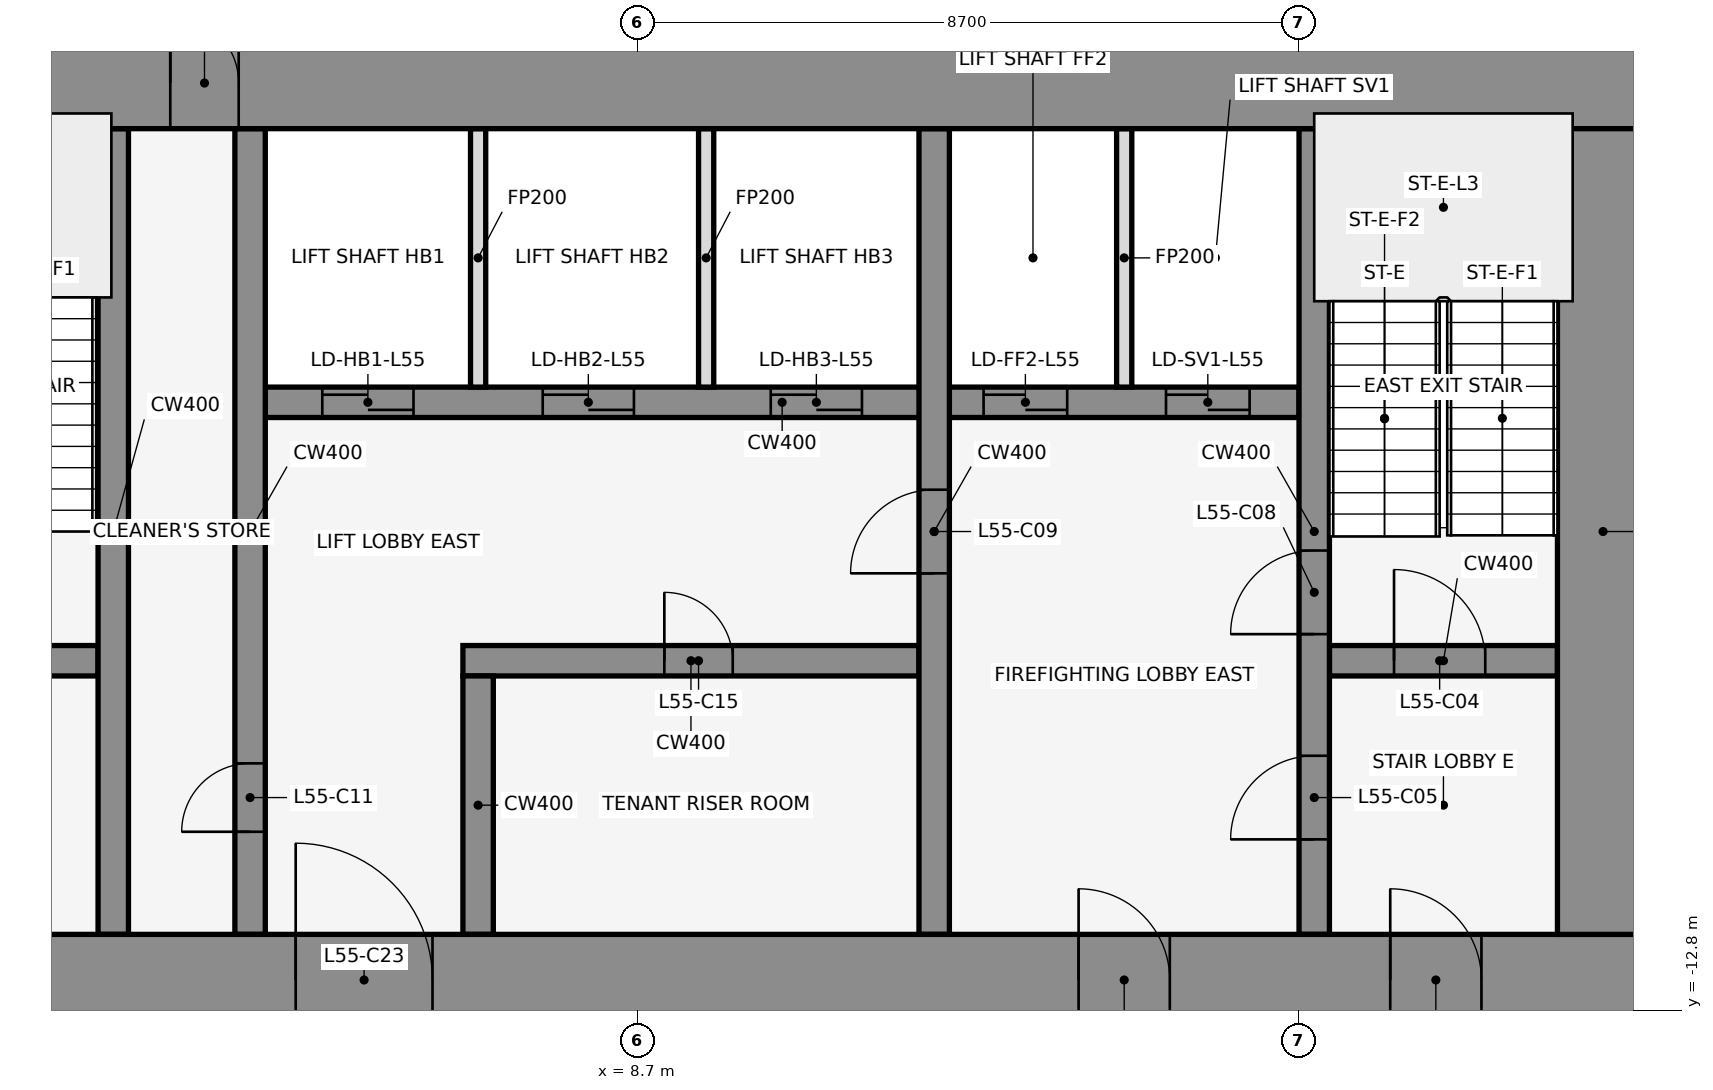
"""IFC4 building model, lengths in metres.
Left out: names, types, materials, properties, quantities, classifications, styles, units other than length and angle.
Written with IfcOpenShell. Run it as: python <this file> out.ifc"""

import sys

from ifc_helpers import new_model, si_unit, direction, frame, frame_2d, origin, place, context, subcontext, project, spatial, rectangle, extrude, element, fill, save


model = new_model("IFC4")
c1 = context("Model", 3, precision=1e-05, world=origin(), true_north=direction((0.0, 1.0)))
c2 = subcontext(c1, "Body", "Model", "MODEL_VIEW")
j1 = project(units=[si_unit("LENGTHUNIT", "METRE"), si_unit("PLANEANGLEUNIT", "RADIAN")], contexts=[c1])
p1 = place(None, origin())
s1 = spatial("IfcSite", under=j1, at=p1, CompositionType="ELEMENT")
p2 = place(p1, origin())
s2 = spatial("IfcBuilding", under=s1, at=p2, CompositionType="ELEMENT")
p3 = place(p2, frame((0.0, 0.0, 245.6)))
s3 = spatial("IfcBuildingStorey", under=s2, at=p3, CompositionType="ELEMENT", Elevation=245.6)
for number, where, z_axis, x_axis in (
    (1, (16.432, -0.105, 0.0), (0.0, 0.0, 1.0), (-0.84, 0.543, 0.0)),
    (2, (1.901, 1.08, 0.0), (0.0, 0.0, 1.0), (-0.84, -0.543, 0.0)),
):
    element("IfcWall", number, at=place(p3, frame(where, z_axis=z_axis, x_axis=x_axis)), inside=s3, PredefinedType="STANDARD", context=c2, shape_type="SweptSolid", body=[
        extrude(rectangle(XDim=2.183, YDim=0.25, at=frame_2d((1.091, 0.0))), origin(), (0.0, 0.0, 1.0), 4.05),
    ])
p4 = place(p3, frame((-1.6, -8.2, 0.0), z_axis=(0.0, 0.0, 1.0), x_axis=(1.0, 0.0, 0.0)))
e3 = element("IfcWall", 3, at=p4, inside=s3, PredefinedType="SHEAR", context=c2, shape_type="SweptSolid", body=[
    extrude(rectangle(XDim=3.2, YDim=0.4, at=frame_2d((1.6, 0.0))), origin(), (0.0, 0.0, 1.0), 4.2),
])
p5 = place(p4, frame((1.05, 0.0, 0.0)))
e4 = element("IfcOpeningElement", 4, at=p5, cuts=e3, PredefinedType="OPENING", context=c2, shape_type="SweptSolid", body=[
    extrude(rectangle(XDim=1.2, YDim=2.1, at=frame_2d((0.6, 1.05))), frame((0.0, 0.212, 0.0), z_axis=(0.0, -1.0, 0.0), x_axis=(1.0, 0.0, 0.0)), (0.0, 0.0, 1.0), 0.424),
])
p6 = place(p3, frame((6.4, -8.2, 0.0), z_axis=(0.0, 0.0, 1.0), x_axis=(1.0, 0.0, 0.0)))
e5 = element("IfcWall", 5, at=p6, inside=s3, PredefinedType="SHEAR", context=c2, shape_type="SweptSolid", body=[
    extrude(rectangle(XDim=6.0, YDim=0.4, at=frame_2d((3.0, 0.0))), origin(), (0.0, 0.0, 1.0), 4.2),
])
p7 = place(p6, frame((2.65, 0.0, 0.0)))
e6 = element("IfcOpeningElement", 6, at=p7, cuts=e5, PredefinedType="OPENING", context=c2, shape_type="SweptSolid", body=[
    extrude(rectangle(XDim=0.9, YDim=2.1, at=frame_2d((0.45, 1.05))), frame((0.0, 0.212, 0.0), z_axis=(0.0, -1.0, 0.0), x_axis=(1.0, 0.0, 0.0)), (0.0, 0.0, 1.0), 0.424),
])
p8 = place(p3, frame((17.8, -8.2, 0.0), z_axis=(0.0, 0.0, 1.0), x_axis=(1.0, 0.0, 0.0)))
e7 = element("IfcWall", 7, at=p8, inside=s3, PredefinedType="SHEAR", context=c2, shape_type="SweptSolid", body=[
    extrude(rectangle(XDim=3.0, YDim=0.4, at=frame_2d((1.5, 0.0))), origin(), (0.0, 0.0, 1.0), 4.2),
])
p9 = place(p8, frame((0.85, 0.0, 0.0)))
e8 = element("IfcOpeningElement", 8, at=p9, cuts=e7, PredefinedType="OPENING", context=c2, shape_type="SweptSolid", body=[
    extrude(rectangle(XDim=1.2, YDim=2.1, at=frame_2d((0.6, 1.05))), frame((0.0, 0.212, 0.0), z_axis=(0.0, -1.0, 0.0), x_axis=(1.0, 0.0, 0.0)), (0.0, 0.0, 1.0), 0.424),
])
p10 = place(p3, frame((3.8, -4.8, 0.0), z_axis=(0.0, 0.0, 1.0), x_axis=(1.0, 0.0, 0.0)))
e9 = element("IfcWall", 9, at=p10, inside=s3, PredefinedType="SHEAR", context=c2, shape_type="SweptSolid", body=[
    extrude(rectangle(XDim=13.6, YDim=0.4, at=frame_2d((6.8, 0.0))), origin(), (0.0, 0.0, 1.0), 4.2),
])
p11 = place(p10, frame((0.75, 0.0, 0.0)))
e10 = element("IfcOpeningElement", 10, at=p11, cuts=e9, PredefinedType="OPENING", context=c2, shape_type="SweptSolid", body=[
    extrude(rectangle(XDim=1.2, YDim=2.1, at=frame_2d((0.6, 1.05))), frame((0.0, 0.212, 0.0), z_axis=(0.0, -1.0, 0.0), x_axis=(1.0, 0.0, 0.0)), (0.0, 0.0, 1.0), 0.424),
])
p12 = place(p10, frame((3.65, 0.0, 0.0)))
e11 = element("IfcOpeningElement", 11, at=p12, cuts=e9, PredefinedType="OPENING", context=c2, shape_type="SweptSolid", body=[
    extrude(rectangle(XDim=1.2, YDim=2.1, at=frame_2d((0.6, 1.05))), frame((0.0, 0.212, 0.0), z_axis=(0.0, -1.0, 0.0), x_axis=(1.0, 0.0, 0.0)), (0.0, 0.0, 1.0), 0.424),
])
p13 = place(p10, frame((6.65, 0.0, 0.0)))
e12 = element("IfcOpeningElement", 12, at=p13, cuts=e9, PredefinedType="OPENING", context=c2, shape_type="SweptSolid", body=[
    extrude(rectangle(XDim=1.2, YDim=2.1, at=frame_2d((0.6, 1.05))), frame((0.0, 0.212, 0.0), z_axis=(0.0, -1.0, 0.0), x_axis=(1.0, 0.0, 0.0)), (0.0, 0.0, 1.0), 0.424),
])
p14 = place(p10, frame((9.45, 0.0, 0.0)))
e13 = element("IfcOpeningElement", 13, at=p14, cuts=e9, PredefinedType="OPENING", context=c2, shape_type="SweptSolid", body=[
    extrude(rectangle(XDim=1.1, YDim=2.1, at=frame_2d((0.55, 1.05))), frame((0.0, 0.212, 0.0), z_axis=(0.0, -1.0, 0.0), x_axis=(1.0, 0.0, 0.0)), (0.0, 0.0, 1.0), 0.424),
])
p15 = place(p10, frame((11.85, 0.0, 0.0)))
e14 = element("IfcOpeningElement", 14, at=p15, cuts=e9, PredefinedType="OPENING", context=c2, shape_type="SweptSolid", body=[
    extrude(rectangle(XDim=1.1, YDim=2.1, at=frame_2d((0.55, 1.05))), frame((0.0, 0.212, 0.0), z_axis=(0.0, -1.0, 0.0), x_axis=(1.0, 0.0, 0.0)), (0.0, 0.0, 1.0), 0.424),
])
p16 = place(p3, frame((1.8, -11.8, 0.0), z_axis=(0.0, 0.0, 1.0), x_axis=(0.0, 1.0, 0.0)))
e15 = element("IfcWall", 15, at=p16, inside=s3, PredefinedType="SHEAR", context=c2, shape_type="SweptSolid", body=[
    extrude(rectangle(XDim=10.6, YDim=0.4, at=frame_2d((5.3, 0.0))), origin(), (0.0, 0.0, 1.0), 4.2),
])
p17 = place(p3, frame((3.6, -11.8, 0.0), z_axis=(0.0, 0.0, 1.0), x_axis=(0.0, 1.0, 0.0)))
e16 = element("IfcWall", 16, at=p17, inside=s3, PredefinedType="SHEAR", context=c2, shape_type="SweptSolid", body=[
    extrude(rectangle(XDim=10.6, YDim=0.4, at=frame_2d((5.3, 0.0))), origin(), (0.0, 0.0, 1.0), 4.2),
])
p18 = place(p17, frame((1.35, 0.0, 0.0)))
e17 = element("IfcOpeningElement", 17, at=p18, cuts=e16, PredefinedType="OPENING", context=c2, shape_type="SweptSolid", body=[
    extrude(rectangle(XDim=0.9, YDim=2.1, at=frame_2d((0.45, 1.05))), frame((0.0, 0.212, 0.0), z_axis=(0.0, -1.0, 0.0), x_axis=(1.0, 0.0, 0.0)), (0.0, 0.0, 1.0), 0.424),
])
p19 = place(p3, frame((6.6, -11.8, 0.0), z_axis=(0.0, 0.0, 1.0), x_axis=(0.0, 1.0, 0.0)))
e18 = element("IfcWall", 18, at=p19, inside=s3, PredefinedType="SHEAR", context=c2, shape_type="SweptSolid", body=[
    extrude(rectangle(XDim=3.4, YDim=0.4, at=frame_2d((1.7, 0.0))), origin(), (0.0, 0.0, 1.0), 4.2),
])
for number, where, z_axis, x_axis in (
    (19, (6.6, -4.6, 0.0), (0.0, 0.0, 1.0), (0.0, 1.0, 0.0)),
    (20, (9.6, -4.6, 0.0), (0.0, 0.0, 1.0), (0.0, 1.0, 0.0)),
):
    element("IfcWall", number, at=place(p3, frame(where, z_axis=z_axis, x_axis=x_axis)), inside=s3, PredefinedType="PARTITIONING", context=c2, shape_type="SweptSolid", body=[
        extrude(rectangle(XDim=3.4, YDim=0.2, at=frame_2d((1.7, 0.0))), origin(), (0.0, 0.0, 1.0), 3.039),
    ])
p20 = place(p3, frame((12.6, -11.8, 0.0), z_axis=(0.0, 0.0, 1.0), x_axis=(0.0, 1.0, 0.0)))
e21 = element("IfcWall", 21, at=p20, inside=s3, PredefinedType="SHEAR", context=c2, shape_type="SweptSolid", body=[
    extrude(rectangle(XDim=10.6, YDim=0.4, at=frame_2d((5.3, 0.0))), origin(), (0.0, 0.0, 1.0), 4.2),
])
p21 = place(p20, frame((4.75, 0.0, 0.0)))
e22 = element("IfcOpeningElement", 22, at=p21, cuts=e21, PredefinedType="OPENING", context=c2, shape_type="SweptSolid", body=[
    extrude(rectangle(XDim=1.1, YDim=2.1, at=frame_2d((0.55, 1.05))), frame((0.0, 0.212, 0.0), z_axis=(0.0, -1.0, 0.0), x_axis=(1.0, 0.0, 0.0)), (0.0, 0.0, 1.0), 0.424),
])
p22 = place(p3, frame((15.1, -4.6, 0.0), z_axis=(0.0, 0.0, 1.0), x_axis=(0.0, 1.0, 0.0)))
e23 = element("IfcWall", 23, at=p22, inside=s3, PredefinedType="PARTITIONING", context=c2, shape_type="SweptSolid", body=[
    extrude(rectangle(XDim=3.4, YDim=0.2, at=frame_2d((1.7, 0.0))), origin(), (0.0, 0.0, 1.0), 3.039),
])
p23 = place(p3, frame((17.6, -11.8, 0.0), z_axis=(0.0, 0.0, 1.0), x_axis=(0.0, 1.0, 0.0)))
e24 = element("IfcWall", 24, at=p23, inside=s3, PredefinedType="SHEAR", context=c2, shape_type="SweptSolid", body=[
    extrude(rectangle(XDim=10.6, YDim=0.4, at=frame_2d((5.3, 0.0))), origin(), (0.0, 0.0, 1.0), 4.2),
])
p24 = place(p23, frame((1.25, 0.0, 0.0)))
e25 = element("IfcOpeningElement", 25, at=p24, cuts=e24, PredefinedType="OPENING", context=c2, shape_type="SweptSolid", body=[
    extrude(rectangle(XDim=1.1, YDim=2.1, at=frame_2d((0.55, 1.05))), frame((0.0, 0.212, 0.0), z_axis=(0.0, -1.0, 0.0), x_axis=(1.0, 0.0, 0.0)), (0.0, 0.0, 1.0), 0.424),
])
p25 = place(p23, frame((3.95, 0.0, 0.0)))
e26 = element("IfcOpeningElement", 26, at=p25, cuts=e24, PredefinedType="OPENING", context=c2, shape_type="SweptSolid", body=[
    extrude(rectangle(XDim=1.1, YDim=2.1, at=frame_2d((0.55, 1.05))), frame((0.0, 0.212, 0.0), z_axis=(0.0, -1.0, 0.0), x_axis=(1.0, 0.0, 0.0)), (0.0, 0.0, 1.0), 0.424),
])
p26 = place(p3, frame((-22.0, -0.6, 0.0), z_axis=(0.0, 0.0, 1.0), x_axis=(1.0, 0.0, 0.0)))
e27 = element("IfcWall", 27, at=p26, inside=s3, PredefinedType="SHEAR", context=c2, shape_type="SweptSolid", body=[
    extrude(rectangle(XDim=44.0, YDim=1.2, at=frame_2d((22.0, 0.0))), origin(), (0.0, 0.0, 1.0), 4.2),
])
p27 = place(p26, frame((18.55, 0.0, 0.0)))
e28 = element("IfcOpeningElement", 28, at=p27, cuts=e27, PredefinedType="OPENING", context=c2, shape_type="SweptSolid", body=[
    extrude(rectangle(XDim=0.9, YDim=2.1, at=frame_2d((0.45, 1.05))), frame((0.0, 0.612, 0.0), z_axis=(0.0, -1.0, 0.0), x_axis=(1.0, 0.0, 0.0)), (0.0, 0.0, 1.0), 1.224),
])
p28 = place(p26, frame((24.55, 0.0, 0.0)))
e29 = element("IfcOpeningElement", 29, at=p28, cuts=e27, PredefinedType="OPENING", context=c2, shape_type="SweptSolid", body=[
    extrude(rectangle(XDim=0.9, YDim=2.1, at=frame_2d((0.45, 1.05))), frame((0.0, 0.612, 0.0), z_axis=(0.0, -1.0, 0.0), x_axis=(1.0, 0.0, 0.0)), (0.0, 0.0, 1.0), 1.224),
])
p29 = place(p3, frame((-22.0, -12.4, 0.0), z_axis=(0.0, 0.0, 1.0), x_axis=(1.0, 0.0, 0.0)))
e30 = element("IfcWall", 30, at=p29, inside=s3, PredefinedType="SHEAR", context=c2, shape_type="SweptSolid", body=[
    extrude(rectangle(XDim=44.0, YDim=1.2, at=frame_2d((22.0, 0.0))), origin(), (0.0, 0.0, 1.0), 4.2),
])
p30 = place(p29, frame((2.2, 0.0, 0.0)))
e31 = element("IfcOpeningElement", 31, at=p30, cuts=e30, PredefinedType="OPENING", context=c2, shape_type="SweptSolid", body=[
    extrude(rectangle(XDim=1.2, YDim=2.1, at=frame_2d((0.6, 1.05))), frame((0.0, 0.612, 0.0), z_axis=(0.0, -1.0, 0.0), x_axis=(1.0, 0.0, 0.0)), (0.0, 0.0, 1.0), 1.224),
])
p31 = place(p29, frame((21.4, 0.0, 0.0)))
e32 = element("IfcOpeningElement", 32, at=p31, cuts=e30, PredefinedType="OPENING", context=c2, shape_type="SweptSolid", body=[
    extrude(rectangle(XDim=1.2, YDim=2.1, at=frame_2d((0.6, 1.05))), frame((0.0, 0.612, 0.0), z_axis=(0.0, -1.0, 0.0), x_axis=(1.0, 0.0, 0.0)), (0.0, 0.0, 1.0), 1.224),
])
p32 = place(p29, frame((40.6, 0.0, 0.0)))
e33 = element("IfcOpeningElement", 33, at=p32, cuts=e30, PredefinedType="OPENING", context=c2, shape_type="SweptSolid", body=[
    extrude(rectangle(XDim=1.2, YDim=2.1, at=frame_2d((0.6, 1.05))), frame((0.0, 0.612, 0.0), z_axis=(0.0, -1.0, 0.0), x_axis=(1.0, 0.0, 0.0)), (0.0, 0.0, 1.0), 1.224),
])
p33 = place(p29, frame((16.0, 0.0, 0.0)))
e34 = element("IfcOpeningElement", 34, at=p33, cuts=e30, PredefinedType="OPENING", context=c2, shape_type="SweptSolid", body=[
    extrude(rectangle(XDim=1.8, YDim=2.1, at=frame_2d((0.9, 1.05))), frame((0.0, 0.612, 0.0), z_axis=(0.0, -1.0, 0.0), x_axis=(1.0, 0.0, 0.0)), (0.0, 0.0, 1.0), 1.224),
])
p34 = place(p29, frame((6.3, 0.0, 0.0)))
e35 = element("IfcOpeningElement", 35, at=p34, cuts=e30, PredefinedType="OPENING", context=c2, shape_type="SweptSolid", body=[
    extrude(rectangle(XDim=1.2, YDim=2.1, at=frame_2d((0.6, 1.05))), frame((0.0, 0.612, 0.0), z_axis=(0.0, -1.0, 0.0), x_axis=(1.0, 0.0, 0.0)), (0.0, 0.0, 1.0), 1.224),
])
p35 = place(p29, frame((26.2, 0.0, 0.0)))
e36 = element("IfcOpeningElement", 36, at=p35, cuts=e30, PredefinedType="OPENING", context=c2, shape_type="SweptSolid", body=[
    extrude(rectangle(XDim=1.8, YDim=2.1, at=frame_2d((0.9, 1.05))), frame((0.0, 0.612, 0.0), z_axis=(0.0, -1.0, 0.0), x_axis=(1.0, 0.0, 0.0)), (0.0, 0.0, 1.0), 1.224),
])
p36 = place(p29, frame((36.5, 0.0, 0.0)))
e37 = element("IfcOpeningElement", 37, at=p36, cuts=e30, PredefinedType="OPENING", context=c2, shape_type="SweptSolid", body=[
    extrude(rectangle(XDim=1.2, YDim=2.1, at=frame_2d((0.6, 1.05))), frame((0.0, 0.612, 0.0), z_axis=(0.0, -1.0, 0.0), x_axis=(1.0, 0.0, 0.0)), (0.0, 0.0, 1.0), 1.224),
])
p37 = place(p3, frame((21.4, -11.8, 0.0), z_axis=(0.0, 0.0, 1.0), x_axis=(0.0, 1.0, 0.0)))
e38 = element("IfcWall", 38, at=p37, inside=s3, PredefinedType="SHEAR", context=c2, shape_type="SweptSolid", body=[
    extrude(rectangle(XDim=10.6, YDim=1.2, at=frame_2d((5.3, 0.0))), origin(), (0.0, 0.0, 1.0), 4.2),
])
p38 = place(p9, origin())
e39 = element("IfcDoor", 39, at=p38, inside=s3, OperationType="SINGLE_SWING_RIGHT", PredefinedType="DOOR", context=c2, shape_type="SweptSolid", body=[
    extrude(rectangle(XDim=1.2, YDim=2.1, at=frame_2d((0.6, 1.05))), frame((0.0, 0.025, 0.0), z_axis=(0.0, -1.0, 0.0), x_axis=(1.0, 0.0, 0.0)), (0.0, 0.0, 1.0), 0.05),
])
fill(e8, e39)
p39 = place(p24, origin())
e40 = element("IfcDoor", 40, at=p39, inside=s3, OperationType="SINGLE_SWING_LEFT", PredefinedType="DOOR", context=c2, shape_type="SweptSolid", body=[
    extrude(rectangle(XDim=1.1, YDim=2.1, at=frame_2d((0.55, 1.05))), frame((0.0, 0.025, 0.0), z_axis=(0.0, -1.0, 0.0), x_axis=(1.0, 0.0, 0.0)), (0.0, 0.0, 1.0), 0.05),
])
fill(e25, e40)
p40 = place(p11, origin())
e41 = element("IfcDoor", 41, at=p40, inside=s3, OperationType="DOUBLE_DOOR_SLIDING", PredefinedType="DOOR", context=c2, shape_type="SweptSolid", body=[
    extrude(rectangle(XDim=1.2, YDim=2.1, at=frame_2d((0.6, 1.05))), frame((0.0, 0.025, 0.0), z_axis=(0.0, -1.0, 0.0), x_axis=(1.0, 0.0, 0.0)), (0.0, 0.0, 1.0), 0.05),
])
fill(e10, e41)
p41 = place(p12, origin())
e42 = element("IfcDoor", 42, at=p41, inside=s3, OperationType="DOUBLE_DOOR_SLIDING", PredefinedType="DOOR", context=c2, shape_type="SweptSolid", body=[
    extrude(rectangle(XDim=1.2, YDim=2.1, at=frame_2d((0.6, 1.05))), frame((0.0, 0.025, 0.0), z_axis=(0.0, -1.0, 0.0), x_axis=(1.0, 0.0, 0.0)), (0.0, 0.0, 1.0), 0.05),
])
fill(e11, e42)
p42 = place(p13, origin())
e43 = element("IfcDoor", 43, at=p42, inside=s3, OperationType="DOUBLE_DOOR_SLIDING", PredefinedType="DOOR", context=c2, shape_type="SweptSolid", body=[
    extrude(rectangle(XDim=1.2, YDim=2.1, at=frame_2d((0.6, 1.05))), frame((0.0, 0.025, 0.0), z_axis=(0.0, -1.0, 0.0), x_axis=(1.0, 0.0, 0.0)), (0.0, 0.0, 1.0), 0.05),
])
fill(e12, e43)
p43 = place(p14, origin())
e44 = element("IfcDoor", 44, at=p43, inside=s3, OperationType="DOUBLE_DOOR_SLIDING", PredefinedType="DOOR", context=c2, shape_type="SweptSolid", body=[
    extrude(rectangle(XDim=1.1, YDim=2.1, at=frame_2d((0.55, 1.05))), frame((0.0, 0.025, 0.0), z_axis=(0.0, -1.0, 0.0), x_axis=(1.0, 0.0, 0.0)), (0.0, 0.0, 1.0), 0.05),
])
fill(e13, e44)
p44 = place(p15, origin())
e45 = element("IfcDoor", 45, at=p44, inside=s3, OperationType="DOUBLE_DOOR_SLIDING", PredefinedType="DOOR", context=c2, shape_type="SweptSolid", body=[
    extrude(rectangle(XDim=1.1, YDim=2.1, at=frame_2d((0.55, 1.05))), frame((0.0, 0.025, 0.0), z_axis=(0.0, -1.0, 0.0), x_axis=(1.0, 0.0, 0.0)), (0.0, 0.0, 1.0), 0.05),
])
fill(e14, e45)
p45 = place(p25, origin())
e46 = element("IfcDoor", 46, at=p45, inside=s3, OperationType="SINGLE_SWING_RIGHT", PredefinedType="DOOR", context=c2, shape_type="SweptSolid", body=[
    extrude(rectangle(XDim=1.1, YDim=2.1, at=frame_2d((0.55, 1.05))), frame((0.0, 0.025, 0.0), z_axis=(0.0, -1.0, 0.0), x_axis=(1.0, 0.0, 0.0)), (0.0, 0.0, 1.0), 0.05),
])
fill(e26, e46)
p46 = place(p21, frame((1.1, 0.0, 0.0), z_axis=(0.0, 0.0, 1.0), x_axis=(-1.0, 0.0, 0.0)))
e47 = element("IfcDoor", 47, at=p46, inside=s3, OperationType="SINGLE_SWING_RIGHT", PredefinedType="DOOR", context=c2, shape_type="SweptSolid", body=[
    extrude(rectangle(XDim=1.1, YDim=2.1, at=frame_2d((0.55, 1.05))), frame((0.0, 0.025, 0.0), z_axis=(0.0, -1.0, 0.0), x_axis=(1.0, 0.0, 0.0)), (0.0, 0.0, 1.0), 0.05),
])
fill(e22, e47)
p47 = place(p18, origin())
e48 = element("IfcDoor", 48, at=p47, inside=s3, OperationType="SINGLE_SWING_LEFT", PredefinedType="DOOR", context=c2, shape_type="SweptSolid", body=[
    extrude(rectangle(XDim=0.9, YDim=2.1, at=frame_2d((0.45, 1.05))), frame((0.0, 0.025, 0.0), z_axis=(0.0, -1.0, 0.0), x_axis=(1.0, 0.0, 0.0)), (0.0, 0.0, 1.0), 0.05),
])
fill(e17, e48)
p48 = place(p7, frame((0.9, 0.0, 0.0), z_axis=(0.0, 0.0, 1.0), x_axis=(-1.0, 0.0, 0.0)))
e49 = element("IfcDoor", 49, at=p48, inside=s3, OperationType="SINGLE_SWING_RIGHT", PredefinedType="DOOR", context=c2, shape_type="SweptSolid", body=[
    extrude(rectangle(XDim=0.9, YDim=2.1, at=frame_2d((0.45, 1.05))), frame((0.0, 0.025, 0.0), z_axis=(0.0, -1.0, 0.0), x_axis=(1.0, 0.0, 0.0)), (0.0, 0.0, 1.0), 0.05),
])
fill(e6, e49)
p49 = place(p28, origin())
e50 = element("IfcDoor", 50, at=p49, inside=s3, OperationType="SINGLE_SWING_LEFT", PredefinedType="DOOR", context=c2, shape_type="SweptSolid", body=[
    extrude(rectangle(XDim=0.9, YDim=2.1, at=frame_2d((0.45, 1.05))), frame((0.0, 0.025, 0.0), z_axis=(0.0, -1.0, 0.0), x_axis=(1.0, 0.0, 0.0)), (0.0, 0.0, 1.0), 0.05),
])
fill(e29, e50)
p50 = place(p32, frame((1.2, 0.0, 0.0), z_axis=(0.0, 0.0, 1.0), x_axis=(-1.0, 0.0, 0.0)))
e51 = element("IfcDoor", 51, at=p50, inside=s3, OperationType="SINGLE_SWING_RIGHT", PredefinedType="DOOR", context=c2, shape_type="SweptSolid", body=[
    extrude(rectangle(XDim=1.2, YDim=2.1, at=frame_2d((0.6, 1.05))), frame((0.0, 0.025, 0.0), z_axis=(0.0, -1.0, 0.0), x_axis=(1.0, 0.0, 0.0)), (0.0, 0.0, 1.0), 0.05),
])
fill(e33, e51)
p51 = place(p35, origin())
e52 = element("IfcDoor", 52, at=p51, inside=s3, OperationType="SINGLE_SWING_LEFT", PredefinedType="DOOR", context=c2, shape_type="SweptSolid", body=[
    extrude(rectangle(XDim=1.8, YDim=2.1, at=frame_2d((0.9, 1.05))), frame((0.0, 0.025, 0.0), z_axis=(0.0, -1.0, 0.0), x_axis=(1.0, 0.0, 0.0)), (0.0, 0.0, 1.0), 0.05),
])
fill(e36, e52)
p52 = place(p36, frame((1.2, 0.0, 0.0), z_axis=(0.0, 0.0, 1.0), x_axis=(-1.0, 0.0, 0.0)))
e53 = element("IfcDoor", 53, at=p52, inside=s3, OperationType="SINGLE_SWING_RIGHT", PredefinedType="DOOR", context=c2, shape_type="SweptSolid", body=[
    extrude(rectangle(XDim=1.2, YDim=2.1, at=frame_2d((0.6, 1.05))), frame((0.0, 0.025, 0.0), z_axis=(0.0, -1.0, 0.0), x_axis=(1.0, 0.0, 0.0)), (0.0, 0.0, 1.0), 0.05),
])
fill(e37, e53)
save(model, sys.argv[1])
